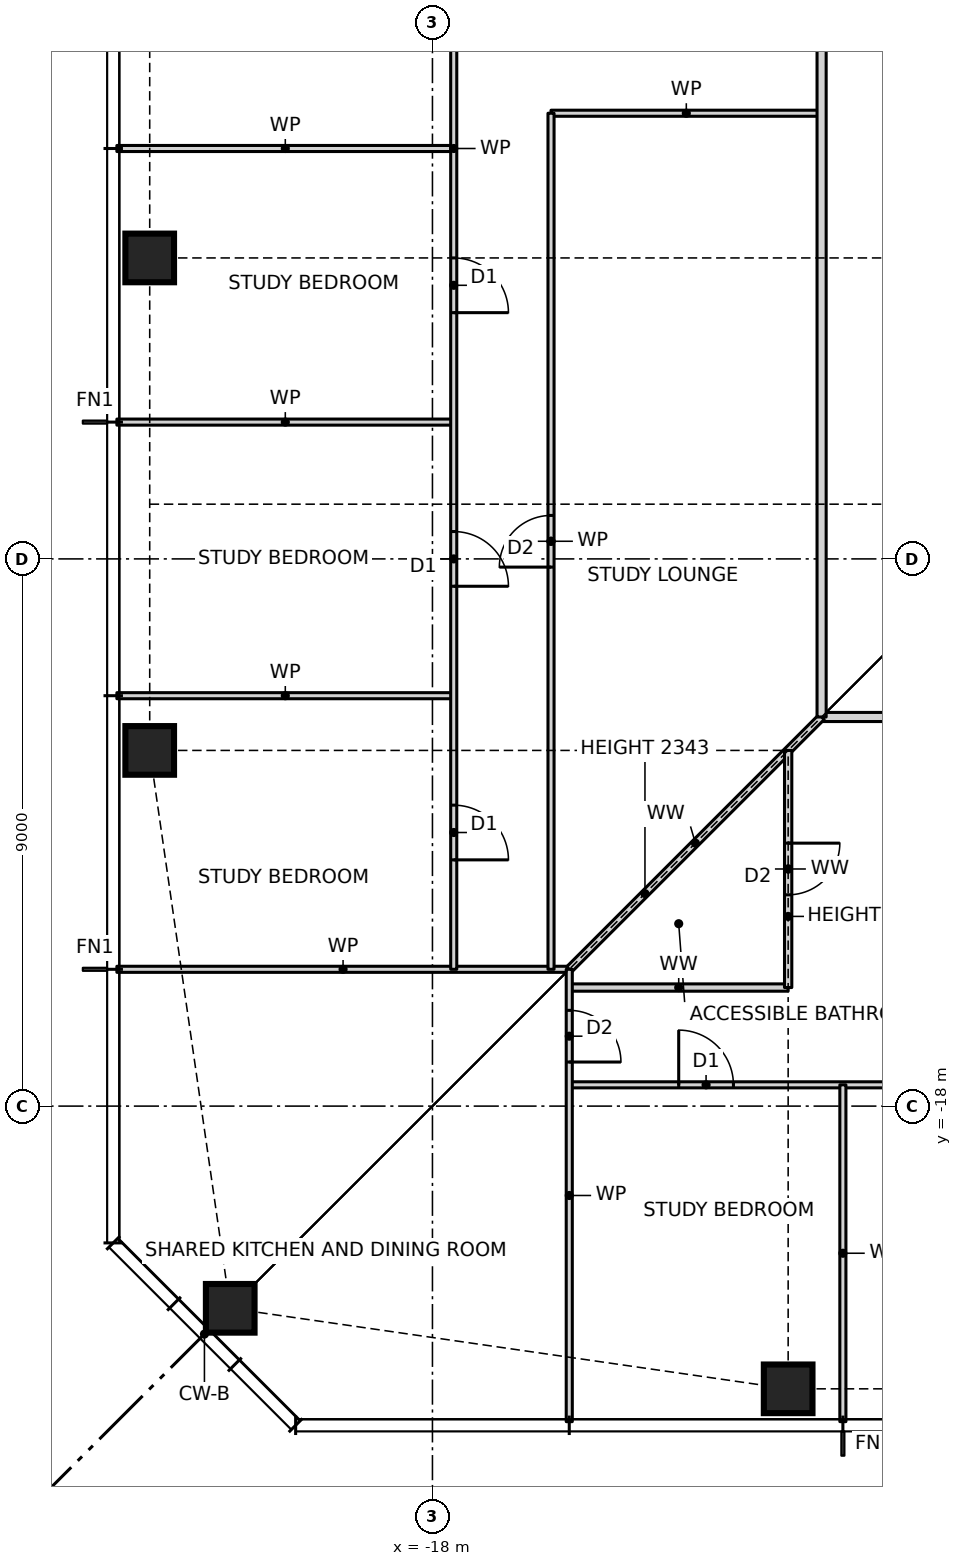
"""IFC4 building model, lengths in metres.
Left out: names, types, materials, properties, quantities, classifications, styles, units other than length and angle.
Written with IfcOpenShell. Run it as: python <this file> out.ifc"""

import sys

from ifc_helpers import new_model, si_unit, direction, frame, frame_2d, origin, origin_2d, place, context, subcontext, project, spatial, rectangle, hollow_rectangle, extrude, element, fill, save


model = new_model("IFC4")
c1 = context("Model", 3, precision=1e-05, world=origin(), true_north=direction((0.0, 1.0)))
c2 = subcontext(c1, "Body", "Model", "MODEL_VIEW")
j1 = project(units=[si_unit("LENGTHUNIT", "METRE"), si_unit("PLANEANGLEUNIT", "RADIAN")], contexts=[c1])
p1 = place(None, origin())
s1 = spatial("IfcSite", under=j1, at=p1, CompositionType="ELEMENT")
p2 = place(p1, origin())
s2 = spatial("IfcBuilding", under=s1, at=p2, CompositionType="ELEMENT")
p3 = place(p2, frame((0.0, 0.0, 36.0)))
s3 = spatial("IfcBuildingStorey", under=s2, at=p3, CompositionType="ELEMENT", Elevation=36.0)
for number, where, z_axis, x_axis in (
    (1, (-21.326, -21.326, 0.0), (0.0, 0.0, 1.0), (1.0, 0.0, 0.0)),
    (2, (-12.15, -22.65, 0.0), (0.0, 0.0, 1.0), (1.0, 0.0, 0.0)),
    (3, (-22.65, -4.05, 0.0), (0.0, 0.0, 1.0), (1.0, 0.0, 0.0)),
    (4, (-22.65, -12.15, 0.0), (0.0, 0.0, 1.0), (1.0, 0.0, 0.0)),
):
    element("IfcColumn", number, at=place(p3, frame(where, z_axis=z_axis, x_axis=x_axis)), inside=s3, PredefinedType="COLUMN", context=c2, shape_type="SweptSolid", body=[
        extrude(hollow_rectangle(XDim=0.8, YDim=0.8, WallThickness=0.09, at=origin_2d()), origin(), (0.0, 0.0, 1.0), 3.5),
    ])
p4 = place(p3, frame((-15.75, -17.65, 0.0), z_axis=(0.0, 0.0, 1.0), x_axis=(1.0, 0.0, 0.0)))
e5 = element("IfcWall", 5, at=p4, inside=s3, PredefinedType="PARTITIONING", context=c2, shape_type="SweptSolid", body=[
    extrude(rectangle(XDim=27.0, YDim=0.1, at=frame_2d((13.5, 0.0))), origin(), (0.0, 0.0, 1.0), 3.0),
])
p5 = place(p4, frame((1.8, 0.0, 0.0)))
e6 = element("IfcOpeningElement", 6, at=p5, cuts=e5, PredefinedType="OPENING", context=c2, shape_type="SweptSolid", body=[
    extrude(rectangle(XDim=0.9, YDim=2.1, at=frame_2d((0.45, 1.05))), frame((0.0, 0.06, 0.0), z_axis=(0.0, -1.0, 0.0), x_axis=(1.0, 0.0, 0.0)), (0.0, 0.0, 1.0), 0.12),
])
p6 = place(p4, frame((6.3, 0.0, 0.0)))
e7 = element("IfcOpeningElement", 7, at=p6, cuts=e5, PredefinedType="OPENING", context=c2, shape_type="SweptSolid", body=[
    extrude(rectangle(XDim=0.9, YDim=2.1, at=frame_2d((0.45, 1.05))), frame((0.0, 0.06, 0.0), z_axis=(0.0, -1.0, 0.0), x_axis=(1.0, 0.0, 0.0)), (0.0, 0.0, 1.0), 0.12),
])
p7 = place(p4, frame((10.8, 0.0, 0.0)))
e8 = element("IfcOpeningElement", 8, at=p7, cuts=e5, PredefinedType="OPENING", context=c2, shape_type="SweptSolid", body=[
    extrude(rectangle(XDim=0.9, YDim=2.1, at=frame_2d((0.45, 1.05))), frame((0.0, 0.06, 0.0), z_axis=(0.0, -1.0, 0.0), x_axis=(1.0, 0.0, 0.0)), (0.0, 0.0, 1.0), 0.12),
])
p8 = place(p4, frame((15.3, 0.0, 0.0)))
e9 = element("IfcOpeningElement", 9, at=p8, cuts=e5, PredefinedType="OPENING", context=c2, shape_type="SweptSolid", body=[
    extrude(rectangle(XDim=0.9, YDim=2.1, at=frame_2d((0.45, 1.05))), frame((0.0, 0.06, 0.0), z_axis=(0.0, -1.0, 0.0), x_axis=(1.0, 0.0, 0.0)), (0.0, 0.0, 1.0), 0.12),
])
p9 = place(p4, frame((19.8, 0.0, 0.0)))
e10 = element("IfcOpeningElement", 10, at=p9, cuts=e5, PredefinedType="OPENING", context=c2, shape_type="SweptSolid", body=[
    extrude(rectangle(XDim=0.9, YDim=2.1, at=frame_2d((0.45, 1.05))), frame((0.0, 0.06, 0.0), z_axis=(0.0, -1.0, 0.0), x_axis=(1.0, 0.0, 0.0)), (0.0, 0.0, 1.0), 0.12),
])
p10 = place(p4, frame((24.3, 0.0, 0.0)))
e11 = element("IfcOpeningElement", 11, at=p10, cuts=e5, PredefinedType="OPENING", context=c2, shape_type="SweptSolid", body=[
    extrude(rectangle(XDim=0.9, YDim=2.1, at=frame_2d((0.45, 1.05))), frame((0.0, 0.06, 0.0), z_axis=(0.0, -1.0, 0.0), x_axis=(1.0, 0.0, 0.0)), (0.0, 0.0, 1.0), 0.12),
])
p11 = place(p3, frame((-15.75, -16.05, 0.0), z_axis=(0.0, 0.0, 1.0), x_axis=(1.0, 0.0, 0.0)))
e12 = element("IfcWall", 12, at=p11, inside=s3, PredefinedType="PARTITIONING", context=c2, shape_type="SweptSolid", body=[
    extrude(rectangle(XDim=3.6, YDim=0.12, at=frame_2d((1.8, 0.0))), origin(), (0.0, 0.0, 1.0), 3.27),
])
p12 = place(p3, frame((-23.19, -15.75, 0.0), z_axis=(0.0, 0.0, 1.0), x_axis=(1.0, 0.0, 0.0)))
e13 = element("IfcWall", 13, at=p12, inside=s3, PredefinedType="PARTITIONING", context=c2, shape_type="SweptSolid", body=[
    extrude(rectangle(XDim=7.44, YDim=0.1, at=frame_2d((3.72, 0.0))), origin(), (0.0, 0.0, 1.0), 3.27),
])
p13 = place(p3, frame((-11.6, -11.6, 0.0), z_axis=(0.0, 0.0, 1.0), x_axis=(1.0, 0.0, 0.0)))
e14 = element("IfcWall", 14, at=p13, inside=s3, PredefinedType="PARTITIONING", context=c2, shape_type="SweptSolid", body=[
    extrude(rectangle(XDim=23.2, YDim=0.15, at=frame_2d((11.6, 0.0))), origin(), (0.0, 0.0, 1.0), 3.27),
])
p14 = place(p13, frame((2.975, 0.0, 0.0)))
e15 = element("IfcOpeningElement", 15, at=p14, cuts=e14, PredefinedType="OPENING", context=c2, shape_type="SweptSolid", body=[
    extrude(rectangle(XDim=1.0, YDim=2.1, at=frame_2d((0.5, 1.05))), frame((0.0, 0.085, 0.0), z_axis=(0.0, -1.0, 0.0), x_axis=(1.0, 0.0, 0.0)), (0.0, 0.0, 1.0), 0.17),
])
p15 = place(p13, frame((18.6, 0.0, 0.0)))
e16 = element("IfcOpeningElement", 16, at=p15, cuts=e14, PredefinedType="OPENING", context=c2, shape_type="SweptSolid", body=[
    extrude(rectangle(XDim=1.0, YDim=2.1, at=frame_2d((0.5, 1.05))), frame((0.0, 0.085, 0.0), z_axis=(0.0, -1.0, 0.0), x_axis=(1.0, 0.0, 0.0)), (0.0, 0.0, 1.0), 0.17),
])
for number, where, z_axis, x_axis in (
    (17, (-23.19, -11.25, 0.0), (0.0, 0.0, 1.0), (1.0, 0.0, 0.0)),
    (18, (-23.19, -6.75, 0.0), (0.0, 0.0, 1.0), (1.0, 0.0, 0.0)),
    (19, (-23.19, -2.25, 0.0), (0.0, 0.0, 1.0), (1.0, 0.0, 0.0)),
):
    element("IfcWall", number, at=place(p3, frame(where, z_axis=z_axis, x_axis=x_axis)), inside=s3, PredefinedType="PARTITIONING", context=c2, shape_type="SweptSolid", body=[
        extrude(rectangle(XDim=5.54, YDim=0.1, at=frame_2d((2.77, 0.0))), origin(), (0.0, 0.0, 1.0), 3.27),
    ])
p16 = place(p3, frame((-16.05, -1.67, 0.0), z_axis=(0.0, 0.0, 1.0), x_axis=(1.0, 0.0, 0.0)))
e20 = element("IfcWall", 20, at=p16, inside=s3, PredefinedType="PARTITIONING", context=c2, shape_type="SweptSolid", body=[
    extrude(rectangle(XDim=4.45, YDim=0.1, at=frame_2d((2.225, 0.0))), origin(), (0.0, 0.0, 1.0), 3.27),
])
p17 = place(p3, frame((-15.75, -15.75, 0.0), z_axis=(0.0, 0.0, 1.0), x_axis=(0.707106781187, 0.707106781187, 0.0)))
e21 = element("IfcWall", 21, at=p17, inside=s3, PredefinedType="PARTITIONING", context=c2, shape_type="SweptSolid", body=[
    extrude(rectangle(XDim=5.869, YDim=0.12, at=frame_2d((2.935, 0.0))), origin(), (0.0, 0.0, 1.0), 2.343),
])
p18 = place(p3, frame((-11.25, -23.19, 0.0), z_axis=(0.0, 0.0, 1.0), x_axis=(0.0, 1.0, 0.0)))
e22 = element("IfcWall", 22, at=p18, inside=s3, PredefinedType="PARTITIONING", context=c2, shape_type="SweptSolid", body=[
    extrude(rectangle(XDim=5.54, YDim=0.1, at=frame_2d((2.77, 0.0))), origin(), (0.0, 0.0, 1.0), 3.27),
])
p19 = place(p3, frame((-11.6, -11.6, 0.0), z_axis=(0.0, 0.0, 1.0), x_axis=(0.0, 1.0, 0.0)))
e23 = element("IfcWall", 23, at=p19, inside=s3, PredefinedType="PARTITIONING", context=c2, shape_type="SweptSolid", body=[
    extrude(rectangle(XDim=24.2, YDim=0.15, at=frame_2d((12.1, 0.0))), origin(), (0.0, 0.0, 1.0), 3.27),
])
p20 = place(p19, frame((12.14, 0.0, 0.0)))
e24 = element("IfcOpeningElement", 24, at=p20, cuts=e23, PredefinedType="OPENING", context=c2, shape_type="SweptSolid", body=[
    extrude(rectangle(XDim=1.0, YDim=2.1, at=frame_2d((0.5, 1.05))), frame((0.0, 0.085, 0.0), z_axis=(0.0, -1.0, 0.0), x_axis=(1.0, 0.0, 0.0)), (0.0, 0.0, 1.0), 0.17),
])
p21 = place(p3, frame((-12.15, -16.05, 0.0), z_axis=(0.0, 0.0, 1.0), x_axis=(0.0, 1.0, 0.0)))
e25 = element("IfcWall", 25, at=p21, inside=s3, PredefinedType="PARTITIONING", context=c2, shape_type="SweptSolid", body=[
    extrude(rectangle(XDim=3.9, YDim=0.12, at=frame_2d((1.95, 0.0))), origin(), (0.0, 0.0, 1.0), 2.508),
])
p22 = place(p21, frame((1.525, 0.0, 0.0)))
e26 = element("IfcOpeningElement", 26, at=p22, cuts=e25, PredefinedType="OPENING", context=c2, shape_type="SweptSolid", body=[
    extrude(rectangle(XDim=0.85, YDim=2.1, at=frame_2d((0.425, 1.05))), frame((0.0, 0.07, 0.0), z_axis=(0.0, -1.0, 0.0), x_axis=(1.0, 0.0, 0.0)), (0.0, 0.0, 1.0), 0.14),
])
p23 = place(p3, frame((-15.75, -23.19, 0.0), z_axis=(0.0, 0.0, 1.0), x_axis=(0.0, 1.0, 0.0)))
e27 = element("IfcWall", 27, at=p23, inside=s3, PredefinedType="PARTITIONING", context=c2, shape_type="SweptSolid", body=[
    extrude(rectangle(XDim=7.44, YDim=0.1, at=frame_2d((3.72, 0.0))), origin(), (0.0, 0.0, 1.0), 3.27),
])
p24 = place(p23, frame((5.915, 0.0, 0.0)))
e28 = element("IfcOpeningElement", 28, at=p24, cuts=e27, PredefinedType="OPENING", context=c2, shape_type="SweptSolid", body=[
    extrude(rectangle(XDim=0.85, YDim=2.1, at=frame_2d((0.425, 1.05))), frame((0.0, 0.06, 0.0), z_axis=(0.0, -1.0, 0.0), x_axis=(1.0, 0.0, 0.0)), (0.0, 0.0, 1.0), 0.12),
])
p25 = place(p3, frame((-16.05, -15.75, 0.0), z_axis=(0.0, 0.0, 1.0), x_axis=(0.0, 1.0, 0.0)))
e29 = element("IfcWall", 29, at=p25, inside=s3, PredefinedType="PARTITIONING", context=c2, shape_type="SweptSolid", body=[
    extrude(rectangle(XDim=14.08, YDim=0.1, at=frame_2d((7.04, 0.0))), origin(), (0.0, 0.0, 1.0), 3.27),
])
p26 = place(p25, frame((6.615, 0.0, 0.0)))
e30 = element("IfcOpeningElement", 30, at=p26, cuts=e29, PredefinedType="OPENING", context=c2, shape_type="SweptSolid", body=[
    extrude(rectangle(XDim=0.85, YDim=2.1, at=frame_2d((0.425, 1.05))), frame((0.0, 0.06, 0.0), z_axis=(0.0, -1.0, 0.0), x_axis=(1.0, 0.0, 0.0)), (0.0, 0.0, 1.0), 0.12),
])
p27 = place(p3, frame((-17.65, -15.75, 0.0), z_axis=(0.0, 0.0, 1.0), x_axis=(0.0, 1.0, 0.0)))
e31 = element("IfcWall", 31, at=p27, inside=s3, PredefinedType="PARTITIONING", context=c2, shape_type="SweptSolid", body=[
    extrude(rectangle(XDim=27.0, YDim=0.1, at=frame_2d((13.5, 0.0))), origin(), (0.0, 0.0, 1.0), 3.27),
])
p28 = place(p27, frame((24.3, 0.0, 0.0)))
e32 = element("IfcOpeningElement", 32, at=p28, cuts=e31, PredefinedType="OPENING", context=c2, shape_type="SweptSolid", body=[
    extrude(rectangle(XDim=0.9, YDim=2.1, at=frame_2d((0.45, 1.05))), frame((0.0, 0.06, 0.0), z_axis=(0.0, -1.0, 0.0), x_axis=(1.0, 0.0, 0.0)), (0.0, 0.0, 1.0), 0.12),
])
p29 = place(p27, frame((19.8, 0.0, 0.0)))
e33 = element("IfcOpeningElement", 33, at=p29, cuts=e31, PredefinedType="OPENING", context=c2, shape_type="SweptSolid", body=[
    extrude(rectangle(XDim=0.9, YDim=2.1, at=frame_2d((0.45, 1.05))), frame((0.0, 0.06, 0.0), z_axis=(0.0, -1.0, 0.0), x_axis=(1.0, 0.0, 0.0)), (0.0, 0.0, 1.0), 0.12),
])
p30 = place(p27, frame((15.3, 0.0, 0.0)))
e34 = element("IfcOpeningElement", 34, at=p30, cuts=e31, PredefinedType="OPENING", context=c2, shape_type="SweptSolid", body=[
    extrude(rectangle(XDim=0.9, YDim=2.1, at=frame_2d((0.45, 1.05))), frame((0.0, 0.06, 0.0), z_axis=(0.0, -1.0, 0.0), x_axis=(1.0, 0.0, 0.0)), (0.0, 0.0, 1.0), 0.12),
])
p31 = place(p27, frame((10.8, 0.0, 0.0)))
e35 = element("IfcOpeningElement", 35, at=p31, cuts=e31, PredefinedType="OPENING", context=c2, shape_type="SweptSolid", body=[
    extrude(rectangle(XDim=0.9, YDim=2.1, at=frame_2d((0.45, 1.05))), frame((0.0, 0.06, 0.0), z_axis=(0.0, -1.0, 0.0), x_axis=(1.0, 0.0, 0.0)), (0.0, 0.0, 1.0), 0.12),
])
p32 = place(p27, frame((6.3, 0.0, 0.0)))
e36 = element("IfcOpeningElement", 36, at=p32, cuts=e31, PredefinedType="OPENING", context=c2, shape_type="SweptSolid", body=[
    extrude(rectangle(XDim=0.9, YDim=2.1, at=frame_2d((0.45, 1.05))), frame((0.0, 0.06, 0.0), z_axis=(0.0, -1.0, 0.0), x_axis=(1.0, 0.0, 0.0)), (0.0, 0.0, 1.0), 0.12),
])
p33 = place(p27, frame((1.8, 0.0, 0.0)))
e37 = element("IfcOpeningElement", 37, at=p33, cuts=e31, PredefinedType="OPENING", context=c2, shape_type="SweptSolid", body=[
    extrude(rectangle(XDim=0.9, YDim=2.1, at=frame_2d((0.45, 1.05))), frame((0.0, 0.06, 0.0), z_axis=(0.0, -1.0, 0.0), x_axis=(1.0, 0.0, 0.0)), (0.0, 0.0, 1.0), 0.12),
])
p34 = place(p5, origin())
e38 = element("IfcDoor", 38, at=p34, inside=s3, OperationType="SINGLE_SWING_LEFT", PredefinedType="DOOR", context=c2, shape_type="SweptSolid", body=[
    extrude(rectangle(XDim=0.9, YDim=2.1, at=frame_2d((0.45, 1.05))), frame((0.0, 0.025, 0.0), z_axis=(0.0, -1.0, 0.0), x_axis=(1.0, 0.0, 0.0)), (0.0, 0.0, 1.0), 0.05),
])
fill(e6, e38)
p35 = place(p22, frame((0.85, 0.0, 0.0), z_axis=(0.0, 0.0, 1.0), x_axis=(-1.0, 0.0, 0.0)))
e39 = element("IfcDoor", 39, at=p35, inside=s3, OperationType="SINGLE_SWING_LEFT", PredefinedType="DOOR", context=c2, shape_type="SweptSolid", body=[
    extrude(rectangle(XDim=0.85, YDim=2.1, at=frame_2d((0.425, 1.05))), frame((0.0, 0.025, 0.0), z_axis=(0.0, -1.0, 0.0), x_axis=(1.0, 0.0, 0.0)), (0.0, 0.0, 1.0), 0.05),
])
fill(e26, e39)
p36 = place(p31, frame((0.9, 0.0, 0.0), z_axis=(0.0, 0.0, 1.0), x_axis=(-1.0, 0.0, 0.0)))
e40 = element("IfcDoor", 40, at=p36, inside=s3, OperationType="SINGLE_SWING_RIGHT", PredefinedType="DOOR", context=c2, shape_type="SweptSolid", body=[
    extrude(rectangle(XDim=0.9, YDim=2.1, at=frame_2d((0.45, 1.05))), frame((0.0, 0.025, 0.0), z_axis=(0.0, -1.0, 0.0), x_axis=(1.0, 0.0, 0.0)), (0.0, 0.0, 1.0), 0.05),
])
fill(e35, e40)
p37 = place(p32, frame((0.9, 0.0, 0.0), z_axis=(0.0, 0.0, 1.0), x_axis=(-1.0, 0.0, 0.0)))
e41 = element("IfcDoor", 41, at=p37, inside=s3, OperationType="SINGLE_SWING_RIGHT", PredefinedType="DOOR", context=c2, shape_type="SweptSolid", body=[
    extrude(rectangle(XDim=0.9, YDim=2.1, at=frame_2d((0.45, 1.05))), frame((0.0, 0.025, 0.0), z_axis=(0.0, -1.0, 0.0), x_axis=(1.0, 0.0, 0.0)), (0.0, 0.0, 1.0), 0.05),
])
fill(e36, e41)
p38 = place(p33, frame((0.9, 0.0, 0.0), z_axis=(0.0, 0.0, 1.0), x_axis=(-1.0, 0.0, 0.0)))
e42 = element("IfcDoor", 42, at=p38, inside=s3, OperationType="SINGLE_SWING_RIGHT", PredefinedType="DOOR", context=c2, shape_type="SweptSolid", body=[
    extrude(rectangle(XDim=0.9, YDim=2.1, at=frame_2d((0.45, 1.05))), frame((0.0, 0.025, 0.0), z_axis=(0.0, -1.0, 0.0), x_axis=(1.0, 0.0, 0.0)), (0.0, 0.0, 1.0), 0.05),
])
fill(e37, e42)
p39 = place(p26, origin())
e43 = element("IfcDoor", 43, at=p39, inside=s3, OperationType="SINGLE_SWING_LEFT", PredefinedType="DOOR", context=c2, shape_type="SweptSolid", body=[
    extrude(rectangle(XDim=0.85, YDim=2.1, at=frame_2d((0.425, 1.05))), frame((0.0, 0.025, 0.0), z_axis=(0.0, -1.0, 0.0), x_axis=(1.0, 0.0, 0.0)), (0.0, 0.0, 1.0), 0.05),
])
fill(e30, e43)
p40 = place(p24, frame((0.85, 0.0, 0.0), z_axis=(0.0, 0.0, 1.0), x_axis=(-1.0, 0.0, 0.0)))
e44 = element("IfcDoor", 44, at=p40, inside=s3, OperationType="SINGLE_SWING_RIGHT", PredefinedType="DOOR", context=c2, shape_type="SweptSolid", body=[
    extrude(rectangle(XDim=0.85, YDim=2.1, at=frame_2d((0.425, 1.05))), frame((0.0, 0.025, 0.0), z_axis=(0.0, -1.0, 0.0), x_axis=(1.0, 0.0, 0.0)), (0.0, 0.0, 1.0), 0.05),
])
fill(e28, e44)
save(model, sys.argv[1])
